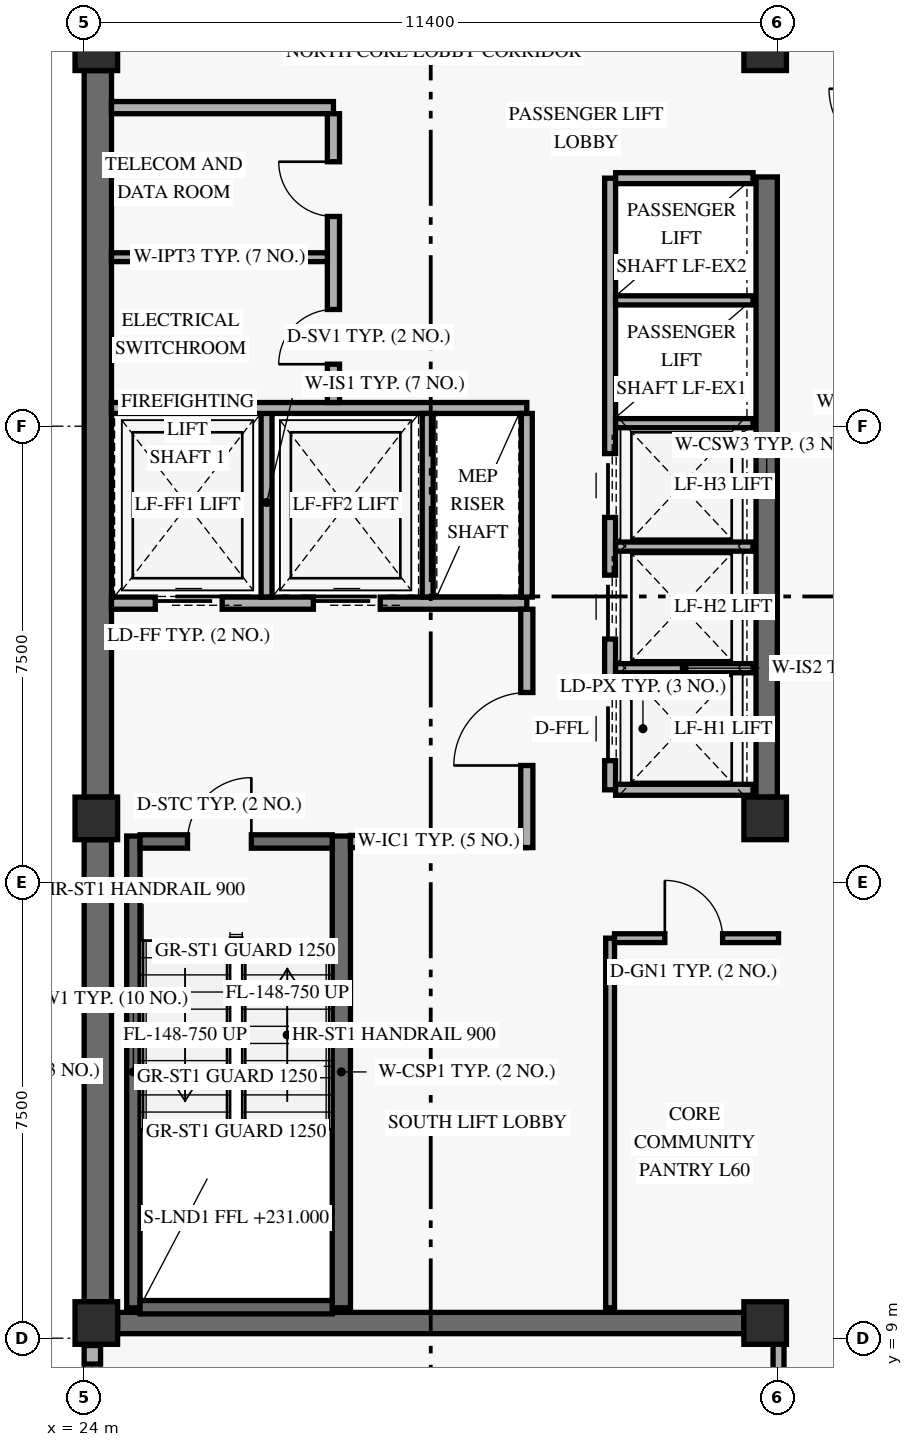
"""IFC4 building model, lengths in metres.
Left out: names, types, materials, properties, quantities, classifications, styles, units other than length and angle.
Written with IfcOpenShell. Run it as: python <this file> out.ifc"""

import sys

from ifc_helpers import new_model, si_unit, direction, frame, frame_2d, origin, origin_2d, place, context, subcontext, project, spatial, rectangle, extrude, element, fill, save


model = new_model("IFC4")
c1 = context("Model", 3, precision=1e-05, world=origin(), true_north=direction((0.0, 1.0)))
c2 = subcontext(c1, "Body", "Model", "MODEL_VIEW")
j1 = project(units=[si_unit("LENGTHUNIT", "METRE"), si_unit("PLANEANGLEUNIT", "RADIAN")], contexts=[c1])
p1 = place(None, origin())
s1 = spatial("IfcSite", under=j1, at=p1, CompositionType="ELEMENT")
p2 = place(p1, origin())
s2 = spatial("IfcBuilding", under=s1, at=p2, CompositionType="ELEMENT")
p3 = place(p2, frame((0.0, 0.0, 231.0)))
s3 = spatial("IfcBuildingStorey", under=s2, at=p3, CompositionType="ELEMENT", Elevation=231.0)
p4 = place(p3, frame((24.225, 9.6, 0.0), z_axis=(0.0, 0.0, 1.0), x_axis=(0.0, 1.0, 0.0)))
e1 = element("IfcWall", 1, at=p4, inside=s3, PredefinedType="SHEAR", context=c2, shape_type="SweptSolid", body=[
    extrude(rectangle(XDim=7.6, YDim=0.45, at=frame_2d((3.8, 0.0))), origin(), (0.0, 0.0, 1.0), 3.421),
])
p5 = place(p3, frame((24.225, 17.9, 0.0), z_axis=(0.0, 0.0, 1.0), x_axis=(0.0, 1.0, 0.0)))
e2 = element("IfcWall", 2, at=p5, inside=s3, PredefinedType="SHEAR", context=c2, shape_type="SweptSolid", body=[
    extrude(rectangle(XDim=11.95, YDim=0.45, at=frame_2d((5.975, 0.0))), origin(), (0.0, 0.0, 1.0), 3.421),
])
p6 = place(p3, frame((35.225, 17.9, 0.0), z_axis=(0.0, 0.0, 1.0), x_axis=(0.0, 1.0, 0.0)))
e3 = element("IfcWall", 3, at=p6, inside=s3, PredefinedType="SHEAR", context=c2, shape_type="SweptSolid", body=[
    extrude(rectangle(XDim=10.2, YDim=0.35, at=frame_2d((5.1, 0.0))), origin(), (0.0, 0.0, 1.0), 3.421),
])
p7 = place(p3, frame((24.55, 9.25, 0.0), z_axis=(0.0, 0.0, 1.0), x_axis=(1.0, 0.0, 0.0)))
e4 = element("IfcWall", 4, at=p7, inside=s3, PredefinedType="SHEAR", context=c2, shape_type="SweptSolid", body=[
    extrude(rectangle(XDim=10.3, YDim=0.35, at=frame_2d((5.15, 0.0))), origin(), (0.0, 0.0, 1.0), 3.96),
])
p8 = place(p3, frame((24.81, 9.5, 0.0), z_axis=(0.0, 0.0, 1.0), x_axis=(0.0, 1.0, 0.0)))
e5 = element("IfcWall", 5, at=p8, inside=s3, PredefinedType="SHEAR", context=c2, shape_type="SweptSolid", body=[
    extrude(rectangle(XDim=7.76, YDim=0.22, at=frame_2d((3.88, 0.0))), origin(), (0.0, 0.0, 1.0), 3.96),
])
p9 = place(p3, frame((28.23, 9.5, 0.0), z_axis=(0.0, 0.0, 1.0), x_axis=(0.0, 1.0, 0.0)))
e6 = element("IfcWall", 6, at=p9, inside=s3, PredefinedType="SHEAR", context=c2, shape_type="SweptSolid", body=[
    extrude(rectangle(XDim=7.76, YDim=0.3, at=frame_2d((3.88, 0.0))), origin(), (0.0, 0.0, 1.0), 3.96),
])
p10 = place(p3, frame((24.92, 9.51, 0.0), z_axis=(0.0, 0.0, 1.0), x_axis=(1.0, 0.0, 0.0)))
e7 = element("IfcWall", 7, at=p10, inside=s3, PredefinedType="SHEAR", context=c2, shape_type="SweptSolid", body=[
    extrude(rectangle(XDim=3.16, YDim=0.22, at=frame_2d((1.58, 0.0))), origin(), (0.0, 0.0, 1.0), 3.96),
])
p11 = place(p3, frame((24.92, 17.17, 0.0), z_axis=(0.0, 0.0, 1.0), x_axis=(1.0, 0.0, 0.0)))
e8 = element("IfcWall", 8, at=p11, inside=s3, PredefinedType="SHEAR", context=c2, shape_type="SweptSolid", body=[
    extrude(rectangle(XDim=3.16, YDim=0.22, at=frame_2d((1.58, 0.0))), origin(), (0.0, 0.0, 1.0), 3.96),
])
p12 = place(p11, frame((0.78, 0.0, 0.0)))
e9 = element("IfcOpeningElement", 9, at=p12, cuts=e8, PredefinedType="OPENING", context=c2, shape_type="SweptSolid", body=[
    extrude(rectangle(XDim=1.05, YDim=2.15, at=frame_2d((0.525, 1.075))), frame((0.0, 0.12, 0.0), z_axis=(0.0, -1.0, 0.0), x_axis=(1.0, 0.0, 0.0)), (0.0, 0.0, 1.0), 0.24),
])
for number, where, z_axis, x_axis in (
    (10, (24.2, 9.25, 0.0), (0.0, 0.0, 1.0), (1.0, 0.0, 0.0)),
    (11, (24.2, 17.55, 0.0), (0.0, 0.0, 1.0), (1.0, 0.0, 0.0)),
    (12, (24.2, 30.2, 0.0), (0.0, 0.0, 1.0), (1.0, 0.0, 0.0)),
    (13, (35.2, 9.25, 0.0), (0.0, 0.0, 1.0), (1.0, 0.0, 0.0)),
    (14, (35.2, 17.55, 0.0), (0.0, 0.0, 1.0), (1.0, 0.0, 0.0)),
    (15, (35.2, 30.2, 0.0), (0.0, 0.0, 1.0), (1.0, 0.0, 0.0)),
):
    element("IfcColumn", number, at=place(p3, frame(where, z_axis=z_axis, x_axis=x_axis)), inside=s3, PredefinedType="COLUMN", context=c2, shape_type="SweptSolid", body=[
        extrude(rectangle(XDim=0.7, YDim=0.7, at=origin_2d()), origin(), (0.0, 0.0, 1.0), 4.2),
    ])
p13 = place(p3, frame((24.135, 7.32, 0.0), z_axis=(0.0, 0.0, 1.0), x_axis=(0.0, 1.0, 0.0)))
e16 = element("IfcWall", 16, at=p13, inside=s3, PredefinedType="SOLIDWALL", context=c2, shape_type="SweptSolid", body=[
    extrude(rectangle(XDim=1.56, YDim=0.27, at=frame_2d((0.78, 0.0))), origin(), (0.0, 0.0, 1.0), 3.403),
])
p14 = place(p13, frame((0.305, 0.0, 0.85)))
e17 = element("IfcOpeningElement", 17, at=p14, cuts=e16, PredefinedType="OPENING", context=c2, shape_type="SweptSolid", body=[
    extrude(rectangle(XDim=0.95, YDim=1.5, at=frame_2d((0.475, 0.75))), frame((0.0, 0.145, 0.0), z_axis=(0.0, -1.0, 0.0), x_axis=(1.0, 0.0, 0.0)), (0.0, 0.0, 1.0), 0.29),
])
p15 = place(p3, frame((24.45, 21.09, 0.0), z_axis=(0.0, 0.0, 1.0), x_axis=(1.0, 0.0, 0.0)))
e18 = element("IfcWall", 18, at=p15, inside=s3, PredefinedType="STANDARD", context=c2, shape_type="SweptSolid", body=[
    extrude(rectangle(XDim=6.83, YDim=0.2, at=frame_2d((3.415, 0.0))), origin(), (0.0, 0.0, 1.0), 3.96),
])
p16 = place(p15, frame((0.72, 0.0, 0.0)))
e19 = element("IfcOpeningElement", 19, at=p16, cuts=e18, PredefinedType="OPENING", context=c2, shape_type="SweptSolid", body=[
    extrude(rectangle(XDim=1.1, YDim=2.2, at=frame_2d((0.55, 1.1))), frame((0.0, 0.11, 0.0), z_axis=(0.0, -1.0, 0.0), x_axis=(1.0, 0.0, 0.0)), (0.0, 0.0, 1.0), 0.22),
])
p17 = place(p15, frame((3.32, 0.0, 0.0)))
e20 = element("IfcOpeningElement", 20, at=p17, cuts=e18, PredefinedType="OPENING", context=c2, shape_type="SweptSolid", body=[
    extrude(rectangle(XDim=1.1, YDim=2.2, at=frame_2d((0.55, 1.1))), frame((0.0, 0.11, 0.0), z_axis=(0.0, -1.0, 0.0), x_axis=(1.0, 0.0, 0.0)), (0.0, 0.0, 1.0), 0.22),
])
p18 = place(p3, frame((28.38, 17.17, 0.0), z_axis=(0.0, 0.0, 1.0), x_axis=(1.0, 0.0, 0.0)))
e21 = element("IfcWall", 21, at=p18, inside=s3, PredefinedType="STANDARD", context=c2, shape_type="SweptSolid", body=[
    extrude(rectangle(XDim=2.9, YDim=0.2, at=frame_2d((1.45, 0.0))), origin(), (0.0, 0.0, 1.0), 3.96),
])
p19 = place(p3, frame((31.28, 17.07, 0.0), z_axis=(0.0, 0.0, 1.0), x_axis=(0.0, 1.0, 0.0)))
e22 = element("IfcWall", 22, at=p19, inside=s3, PredefinedType="STANDARD", context=c2, shape_type="SweptSolid", body=[
    extrude(rectangle(XDim=3.92, YDim=0.2, at=frame_2d((1.96, 0.0))), origin(), (0.0, 0.0, 1.0), 3.403),
])
p20 = place(p19, frame((1.35, 0.0, 0.0)))
e23 = element("IfcOpeningElement", 23, at=p20, cuts=e22, PredefinedType="OPENING", context=c2, shape_type="SweptSolid", body=[
    extrude(rectangle(XDim=1.2, YDim=2.15, at=frame_2d((0.6, 1.075))), frame((0.0, 0.11, 0.0), z_axis=(0.0, -1.0, 0.0), x_axis=(1.0, 0.0, 0.0)), (0.0, 0.0, 1.0), 0.22),
])
p21 = place(p3, frame((27.0, 21.19, 0.0), z_axis=(0.0, 0.0, 1.0), x_axis=(0.0, 1.0, 0.0)))
e24 = element("IfcWall", 24, at=p21, inside=s3, PredefinedType="STANDARD", context=c2, shape_type="SweptSolid", body=[
    extrude(rectangle(XDim=3.11, YDim=0.18, at=frame_2d((1.555, 0.0))), origin(), (0.0, 0.0, 1.0), 3.96),
])
p22 = place(p3, frame((24.45, 24.3, 0.0), z_axis=(0.0, 0.0, 1.0), x_axis=(1.0, 0.0, 0.0)))
e25 = element("IfcWall", 25, at=p22, inside=s3, PredefinedType="STANDARD", context=c2, shape_type="SweptSolid", body=[
    extrude(rectangle(XDim=6.83, YDim=0.18, at=frame_2d((3.415, 0.0))), origin(), (0.0, 0.0, 1.0), 3.96),
])
for number, where, z_axis, x_axis in (
    (26, (29.65, 21.19, 0.0), (0.0, 0.0, 1.0), (0.0, 1.0, 0.0)),
    (27, (31.28, 21.19, 0.0), (0.0, 0.0, 1.0), (0.0, 1.0, 0.0)),
):
    element("IfcWall", number, at=place(p3, frame(where, z_axis=z_axis, x_axis=x_axis)), inside=s3, PredefinedType="STANDARD", context=c2, shape_type="SweptSolid", body=[
        extrude(rectangle(XDim=3.02, YDim=0.18, at=frame_2d((1.51, 0.0))), origin(), (0.0, 0.0, 1.0), 3.96),
    ])
p23 = place(p3, frame((24.45, 29.24, 0.0), z_axis=(0.0, 0.0, 1.0), x_axis=(1.0, 0.0, 0.0)))
e28 = element("IfcWall", 28, at=p23, inside=s3, PredefinedType="STANDARD", context=c2, shape_type="SweptSolid", body=[
    extrude(rectangle(XDim=3.65, YDim=0.2, at=frame_2d((1.825, 0.0))), origin(), (0.0, 0.0, 1.0), 3.96),
])
p24 = place(p3, frame((28.1, 24.39, 0.0), z_axis=(0.0, 0.0, 1.0), x_axis=(0.0, 1.0, 0.0)))
e29 = element("IfcWall", 29, at=p24, inside=s3, PredefinedType="STANDARD", context=c2, shape_type="SweptSolid", body=[
    extrude(rectangle(XDim=4.75, YDim=0.2, at=frame_2d((2.375, 0.0))), origin(), (0.0, 0.0, 1.0), 3.96),
])
p25 = place(p24, frame((0.63, 0.0, 0.0)))
e30 = element("IfcOpeningElement", 30, at=p25, cuts=e29, PredefinedType="OPENING", context=c2, shape_type="SweptSolid", body=[
    extrude(rectangle(XDim=0.9, YDim=2.1, at=frame_2d((0.45, 1.05))), frame((0.0, 0.11, 0.0), z_axis=(0.0, -1.0, 0.0), x_axis=(1.0, 0.0, 0.0)), (0.0, 0.0, 1.0), 0.22),
])
p26 = place(p24, frame((3.06, 0.0, 0.0)))
e31 = element("IfcOpeningElement", 31, at=p26, cuts=e29, PredefinedType="OPENING", context=c2, shape_type="SweptSolid", body=[
    extrude(rectangle(XDim=0.9, YDim=2.1, at=frame_2d((0.45, 1.05))), frame((0.0, 0.11, 0.0), z_axis=(0.0, -1.0, 0.0), x_axis=(1.0, 0.0, 0.0)), (0.0, 0.0, 1.0), 0.22),
])
p27 = place(p3, frame((24.45, 26.78, 0.0), z_axis=(0.0, 0.0, 1.0), x_axis=(1.0, 0.0, 0.0)))
e32 = element("IfcWall", 32, at=p27, inside=s3, PredefinedType="PARTITIONING", context=c2, shape_type="SweptSolid", body=[
    extrude(rectangle(XDim=3.55, YDim=0.145, at=frame_2d((1.775, 0.0))), origin(), (0.0, 0.0, 1.0), 3.96),
])
p28 = place(p3, frame((32.65, 18.02, 0.0), z_axis=(0.0, 0.0, 1.0), x_axis=(0.0, 1.0, 0.0)))
e33 = element("IfcWall", 33, at=p28, inside=s3, PredefinedType="STANDARD", context=c2, shape_type="SweptSolid", body=[
    extrude(rectangle(XDim=10.06, YDim=0.18, at=frame_2d((5.03, 0.0))), origin(), (0.0, 0.0, 1.0), 3.96),
])
p29 = place(p28, frame((0.48, 0.0, 0.0)))
e34 = element("IfcOpeningElement", 34, at=p29, cuts=e33, PredefinedType="OPENING", context=c2, shape_type="SweptSolid", body=[
    extrude(rectangle(XDim=1.05, YDim=2.2, at=frame_2d((0.525, 1.1))), frame((0.0, 0.1, 0.0), z_axis=(0.0, -1.0, 0.0), x_axis=(1.0, 0.0, 0.0)), (0.0, 0.0, 1.0), 0.2),
])
p30 = place(p28, frame((2.48, 0.0, 0.0)))
e35 = element("IfcOpeningElement", 35, at=p30, cuts=e33, PredefinedType="OPENING", context=c2, shape_type="SweptSolid", body=[
    extrude(rectangle(XDim=1.05, YDim=2.2, at=frame_2d((0.525, 1.1))), frame((0.0, 0.1, 0.0), z_axis=(0.0, -1.0, 0.0), x_axis=(1.0, 0.0, 0.0)), (0.0, 0.0, 1.0), 0.2),
])
p31 = place(p28, frame((4.48, 0.0, 0.0)))
e36 = element("IfcOpeningElement", 36, at=p31, cuts=e33, PredefinedType="OPENING", context=c2, shape_type="SweptSolid", body=[
    extrude(rectangle(XDim=1.05, YDim=2.2, at=frame_2d((0.525, 1.1))), frame((0.0, 0.1, 0.0), z_axis=(0.0, -1.0, 0.0), x_axis=(1.0, 0.0, 0.0)), (0.0, 0.0, 1.0), 0.2),
])
for number, where, z_axis, x_axis in (
    (37, (32.74, 18.02, 0.0), (0.0, 0.0, 1.0), (1.0, 0.0, 0.0)),
    (38, (32.74, 28.08, 0.0), (0.0, 0.0, 1.0), (1.0, 0.0, 0.0)),
):
    element("IfcWall", number, at=place(p3, frame(where, z_axis=z_axis, x_axis=x_axis)), inside=s3, PredefinedType="STANDARD", context=c2, shape_type="SweptSolid", body=[
        extrude(rectangle(XDim=2.26, YDim=0.18, at=frame_2d((1.13, 0.0))), origin(), (0.0, 0.0, 1.0), 3.96),
    ])
for number, where, z_axis, x_axis in (
    (39, (32.74, 20.02, 0.0), (0.0, 0.0, 1.0), (1.0, 0.0, 0.0)),
    (40, (32.74, 22.02, 0.0), (0.0, 0.0, 1.0), (1.0, 0.0, 0.0)),
    (41, (32.74, 24.05, 0.0), (0.0, 0.0, 1.0), (1.0, 0.0, 0.0)),
    (42, (32.74, 26.07, 0.0), (0.0, 0.0, 1.0), (1.0, 0.0, 0.0)),
):
    element("IfcWall", number, at=place(p3, frame(where, z_axis=z_axis, x_axis=x_axis)), inside=s3, PredefinedType="STANDARD", context=c2, shape_type="SweptSolid", body=[
        extrude(rectangle(XDim=2.26, YDim=0.15, at=frame_2d((1.13, 0.0))), origin(), (0.0, 0.0, 1.0), 3.96),
    ])
p32 = place(p3, frame((35.42, 5.77, 0.0), z_axis=(0.0, 0.0, 1.0), x_axis=(0.0, 1.0, 0.0)))
e43 = element("IfcWall", 43, at=p32, inside=s3, PredefinedType="STANDARD", context=c2, shape_type="SweptSolid", body=[
    extrude(rectangle(XDim=3.48, YDim=0.18, at=frame_2d((1.74, 0.0))), origin(), (0.0, 0.0, 1.0), 3.403),
])
p33 = place(p32, frame((0.92, 0.0, 0.0)))
e44 = element("IfcOpeningElement", 44, at=p33, cuts=e43, PredefinedType="OPENING", context=c2, shape_type="SweptSolid", body=[
    extrude(rectangle(XDim=0.95, YDim=2.15, at=frame_2d((0.475, 1.075))), frame((0.0, 0.1, 0.0), z_axis=(0.0, -1.0, 0.0), x_axis=(1.0, 0.0, 0.0)), (0.0, 0.0, 1.0), 0.2),
])
p34 = place(p3, frame((32.65, 9.5, 0.0), z_axis=(0.0, 0.0, 1.0), x_axis=(0.0, 1.0, 0.0)))
e45 = element("IfcWall", 45, at=p34, inside=s3, PredefinedType="PARTITIONING", context=c2, shape_type="SweptSolid", body=[
    extrude(rectangle(XDim=6.08, YDim=0.145, at=frame_2d((3.04, 0.0))), origin(), (0.0, 0.0, 1.0), 3.96),
])
p35 = place(p3, frame((32.722, 15.58, 0.0), z_axis=(0.0, 0.0, 1.0), x_axis=(1.0, 0.0, 0.0)))
e46 = element("IfcWall", 46, at=p35, inside=s3, PredefinedType="PARTITIONING", context=c2, shape_type="SweptSolid", body=[
    extrude(rectangle(XDim=2.698, YDim=0.145, at=frame_2d((1.349, 0.0))), origin(), (0.0, 0.0, 1.0), 3.403),
])
p36 = place(p35, frame((0.827, 0.0, 0.0)))
e47 = element("IfcOpeningElement", 47, at=p36, cuts=e46, PredefinedType="OPENING", context=c2, shape_type="SweptSolid", body=[
    extrude(rectangle(XDim=0.95, YDim=2.15, at=frame_2d((0.475, 1.075))), frame((0.0, 0.083, 0.0), z_axis=(0.0, -1.0, 0.0), x_axis=(1.0, 0.0, 0.0)), (0.0, 0.0, 1.0), 0.165),
])
p37 = place(p14, origin())
e48 = element("IfcWindow", 48, at=p37, inside=s3, PartitioningType="SINGLE_PANEL", PredefinedType="WINDOW", context=c2, shape_type="SweptSolid", body=[
    extrude(rectangle(XDim=0.95, YDim=1.5, at=frame_2d((0.475, 0.75))), frame((0.0, 0.03, 0.0), z_axis=(0.0, -1.0, 0.0), x_axis=(1.0, 0.0, 0.0)), (0.0, 0.0, 1.0), 0.06),
])
fill(e17, e48)
p38 = place(p12, frame((1.05, 0.0, 0.0), z_axis=(0.0, 0.0, 1.0), x_axis=(-1.0, 0.0, 0.0)))
e49 = element("IfcDoor", 49, at=p38, inside=s3, OperationType="SINGLE_SWING_LEFT", PredefinedType="DOOR", context=c2, shape_type="SweptSolid", body=[
    extrude(rectangle(XDim=1.05, YDim=2.15, at=frame_2d((0.525, 1.075))), frame((0.0, 0.025, 0.0), z_axis=(0.0, -1.0, 0.0), x_axis=(1.0, 0.0, 0.0)), (0.0, 0.0, 1.0), 0.05),
])
fill(e9, e49)
p39 = place(p16, origin())
e50 = element("IfcDoor", 50, at=p39, inside=s3, OperationType="SLIDING_TO_LEFT", PredefinedType="DOOR", context=c2, shape_type="SweptSolid", body=[
    extrude(rectangle(XDim=1.1, YDim=2.2, at=frame_2d((0.55, 1.1))), frame((0.0, 0.025, 0.0), z_axis=(0.0, -1.0, 0.0), x_axis=(1.0, 0.0, 0.0)), (0.0, 0.0, 1.0), 0.05),
])
fill(e19, e50)
p40 = place(p17, origin())
e51 = element("IfcDoor", 51, at=p40, inside=s3, OperationType="SLIDING_TO_LEFT", PredefinedType="DOOR", context=c2, shape_type="SweptSolid", body=[
    extrude(rectangle(XDim=1.1, YDim=2.2, at=frame_2d((0.55, 1.1))), frame((0.0, 0.025, 0.0), z_axis=(0.0, -1.0, 0.0), x_axis=(1.0, 0.0, 0.0)), (0.0, 0.0, 1.0), 0.05),
])
fill(e20, e51)
p41 = place(p20, origin())
e52 = element("IfcDoor", 52, at=p41, inside=s3, OperationType="SINGLE_SWING_LEFT", PredefinedType="DOOR", context=c2, shape_type="SweptSolid", body=[
    extrude(rectangle(XDim=1.2, YDim=2.15, at=frame_2d((0.6, 1.075))), frame((0.0, 0.025, 0.0), z_axis=(0.0, -1.0, 0.0), x_axis=(1.0, 0.0, 0.0)), (0.0, 0.0, 1.0), 0.05),
])
fill(e23, e52)
p42 = place(p25, origin())
e53 = element("IfcDoor", 53, at=p42, inside=s3, OperationType="SINGLE_SWING_LEFT", PredefinedType="DOOR", context=c2, shape_type="SweptSolid", body=[
    extrude(rectangle(XDim=0.9, YDim=2.1, at=frame_2d((0.45, 1.05))), frame((0.0, 0.025, 0.0), z_axis=(0.0, -1.0, 0.0), x_axis=(1.0, 0.0, 0.0)), (0.0, 0.0, 1.0), 0.05),
])
fill(e30, e53)
p43 = place(p26, origin())
e54 = element("IfcDoor", 54, at=p43, inside=s3, OperationType="SINGLE_SWING_RIGHT", PredefinedType="DOOR", context=c2, shape_type="SweptSolid", body=[
    extrude(rectangle(XDim=0.9, YDim=2.1, at=frame_2d((0.45, 1.05))), frame((0.0, 0.025, 0.0), z_axis=(0.0, -1.0, 0.0), x_axis=(1.0, 0.0, 0.0)), (0.0, 0.0, 1.0), 0.05),
])
fill(e31, e54)
p44 = place(p29, origin())
e55 = element("IfcDoor", 55, at=p44, inside=s3, OperationType="SLIDING_TO_LEFT", PredefinedType="DOOR", context=c2, shape_type="SweptSolid", body=[
    extrude(rectangle(XDim=1.05, YDim=2.2, at=frame_2d((0.525, 1.1))), frame((0.0, 0.025, 0.0), z_axis=(0.0, -1.0, 0.0), x_axis=(1.0, 0.0, 0.0)), (0.0, 0.0, 1.0), 0.05),
])
fill(e34, e55)
p45 = place(p30, origin())
e56 = element("IfcDoor", 56, at=p45, inside=s3, OperationType="SLIDING_TO_LEFT", PredefinedType="DOOR", context=c2, shape_type="SweptSolid", body=[
    extrude(rectangle(XDim=1.05, YDim=2.2, at=frame_2d((0.525, 1.1))), frame((0.0, 0.025, 0.0), z_axis=(0.0, -1.0, 0.0), x_axis=(1.0, 0.0, 0.0)), (0.0, 0.0, 1.0), 0.05),
])
fill(e35, e56)
p46 = place(p31, origin())
e57 = element("IfcDoor", 57, at=p46, inside=s3, OperationType="SLIDING_TO_LEFT", PredefinedType="DOOR", context=c2, shape_type="SweptSolid", body=[
    extrude(rectangle(XDim=1.05, YDim=2.2, at=frame_2d((0.525, 1.1))), frame((0.0, 0.025, 0.0), z_axis=(0.0, -1.0, 0.0), x_axis=(1.0, 0.0, 0.0)), (0.0, 0.0, 1.0), 0.05),
])
fill(e36, e57)
p47 = place(p36, origin())
e58 = element("IfcDoor", 58, at=p47, inside=s3, OperationType="SINGLE_SWING_LEFT", PredefinedType="DOOR", context=c2, shape_type="SweptSolid", body=[
    extrude(rectangle(XDim=0.95, YDim=2.15, at=frame_2d((0.475, 1.075))), frame((0.0, 0.025, 0.0), z_axis=(0.0, -1.0, 0.0), x_axis=(1.0, 0.0, 0.0)), (0.0, 0.0, 1.0), 0.05),
])
fill(e47, e58)
save(model, sys.argv[1])
